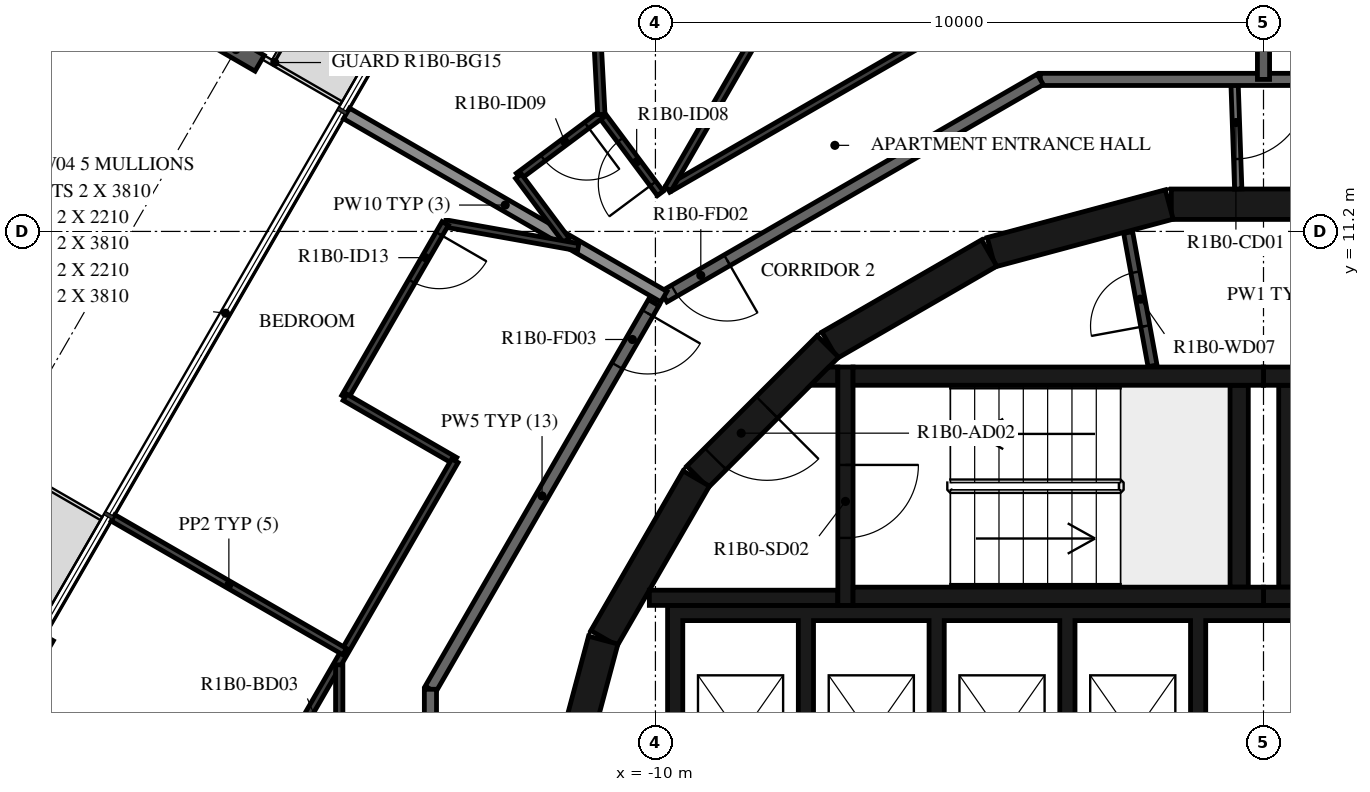
"""IFC4 building model, lengths in metres.
Left out: names, types, materials, properties, quantities, classifications, styles, units other than length and angle.
Written with IfcOpenShell. Run it as: python <this file> out.ifc"""

import sys

from ifc_helpers import new_model, si_unit, direction, frame, frame_2d, origin, origin_2d, place, context, subcontext, project, spatial, polyline, rectangle, i_section, outline, extrude, element, fill, save


model = new_model("IFC4")
c1 = context("Model", 3, precision=1e-05, world=origin(), true_north=direction((0.0, 1.0)))
c2 = subcontext(c1, "Body", "Model", "MODEL_VIEW")
j1 = project(units=[si_unit("LENGTHUNIT", "METRE"), si_unit("PLANEANGLEUNIT", "RADIAN")], contexts=[c1])
p1 = place(None, origin())
s1 = spatial("IfcSite", under=j1, at=p1, CompositionType="ELEMENT")
p2 = place(p1, origin())
s2 = spatial("IfcBuilding", under=s1, at=p2, CompositionType="ELEMENT")
p3 = place(p2, frame((0.0, 0.0, 52.4)))
s3 = spatial("IfcBuildingStorey", under=s2, at=p3, CompositionType="ELEMENT", Elevation=52.4)
p4 = place(p3, frame((-16.899, 14.19, -0.38), z_axis=(0.0, 0.0, 1.0), x_axis=(0.50000017485, 0.866025302835, 0.0)))
e1 = element("IfcColumn", 1, at=p4, inside=s3, PredefinedType="COLUMN", context=c2, shape_type="SweptSolid", body=[
    extrude(i_section(OverallWidth=0.3, OverallDepth=0.9, WebThickness=0.019, FlangeThickness=0.035, FilletRadius=0.03, at=origin_2d()), origin(), (0.0, 0.0, 1.0), 3.5),
])
p5 = place(p3, frame((-19.971, 4.51, 0.0), z_axis=(0.0, 0.0, 1.0), x_axis=(-0.500028443584, -0.866008981251, 0.0)))
e2 = element("IfcWall", 2, at=p5, inside=s3, PredefinedType="STANDARD", context=c2, shape_type="SweptSolid", body=[
    extrude(rectangle(XDim=3.2, YDim=0.16, at=frame_2d((1.6, 0.0))), origin(), (0.0, 0.0, 1.0), 3.12),
])
p6 = place(p5, frame((0.4, 0.0, 0.0)))
e3 = element("IfcOpeningElement", 3, at=p6, cuts=e2, PredefinedType="OPENING", context=c2, shape_type="SweptSolid", body=[
    extrude(rectangle(XDim=2.4, YDim=2.4, at=frame_2d((1.2, 1.2))), frame((0.0, 0.09, 0.0), z_axis=(0.0, -1.0, 0.0), x_axis=(1.0, 0.0, 0.0)), (0.0, 0.0, 1.0), 0.18),
])
for number, where, z_axis, x_axis in (
    (4, (1.516, 11.647, 0.0), (0.0, 0.0, 1.0), (-1.0, 0.0, 0.0)),
    (5, (-1.55, 11.643, 0.0), (0.0, 0.0, 1.0), (-0.966, -0.259, 0.0)),
    (6, (-4.51, 10.845, 0.0), (0.0, 0.0, 1.0), (-0.866, -0.5, 0.0)),
):
    element("IfcWall", number, at=place(p3, frame(where, z_axis=z_axis, x_axis=x_axis)), inside=s3, PredefinedType="SHEAR", context=c2, shape_type="SweptSolid", body=[
        extrude(rectangle(XDim=3.033, YDim=0.5, at=frame_2d((1.516, 0.0))), origin(), (0.0, 0.0, 1.0), 3.12),
    ])
p7 = place(p3, frame((-7.164, 9.308, 0.0), z_axis=(0.0, 0.0, 1.0), x_axis=(-0.707106781187, -0.707106781187, 0.0)))
e7 = element("IfcWall", 7, at=p7, inside=s3, PredefinedType="SHEAR", context=c2, shape_type="SweptSolid", body=[
    extrude(rectangle(XDim=3.032, YDim=0.5, at=frame_2d((1.516, 0.0))), origin(), (0.0, 0.0, 1.0), 3.12),
])
p8 = place(p7, frame((1.416, 0.0, 0.0)))
e8 = element("IfcOpeningElement", 8, at=p8, cuts=e7, PredefinedType="OPENING", context=c2, shape_type="SweptSolid", body=[
    extrude(rectangle(XDim=1.2, YDim=2.1, at=frame_2d((0.6, 1.05))), frame((0.0, 0.26, 0.0), z_axis=(0.0, -1.0, 0.0), x_axis=(1.0, 0.0, 0.0)), (0.0, 0.0, 1.0), 0.52),
])
for number, where, z_axis, x_axis in (
    (9, (-9.329, 7.137, 0.0), (0.0, 0.0, 1.0), (-0.5, -0.866, 0.0)),
    (10, (-10.858, 4.479, 0.0), (0.0, 0.0, 1.0), (-0.259, -0.966, 0.0)),
):
    element("IfcWall", number, at=place(p3, frame(where, z_axis=z_axis, x_axis=x_axis)), inside=s3, PredefinedType="SHEAR", context=c2, shape_type="SweptSolid", body=[
        extrude(rectangle(XDim=3.033, YDim=0.5, at=frame_2d((1.516, 0.0))), origin(), (0.0, 0.0, 1.0), 3.12),
    ])
for number, where, z_axis, x_axis in (
    (11, (0.0, 5.2, 0.0), (0.0, 0.0, 1.0), (1.0, 0.0, 0.0)),
    (12, (0.0, 8.82, 0.0), (0.0, 0.0, 1.0), (1.0, 0.0, 0.0)),
):
    element("IfcWall", number, at=place(p3, frame(where, z_axis=z_axis, x_axis=x_axis)), inside=s3, PredefinedType="SHEAR", context=c2, shape_type="SweptSolid", body=[
        extrude(rectangle(XDim=6.75, YDim=0.3, at=frame_2d((3.375, 0.0))), origin(), (0.0, 0.0, 1.0), 3.12),
    ])
p9 = place(p3, frame((0.4, 5.35, 0.0), z_axis=(0.0, 0.0, 1.0), x_axis=(0.0, 1.0, 0.0)))
e13 = element("IfcWall", 13, at=p9, inside=s3, PredefinedType="SHEAR", context=c2, shape_type="SweptSolid", body=[
    extrude(rectangle(XDim=3.32, YDim=0.3, at=frame_2d((1.66, 0.0))), origin(), (0.0, 0.0, 1.0), 3.12),
])
for number, where, z_axis, x_axis in (
    (14, (-6.75, 5.2, 0.0), (0.0, 0.0, 1.0), (1.0, 0.0, 0.0)),
    (15, (-6.75, 8.82, 0.0), (0.0, 0.0, 1.0), (1.0, 0.0, 0.0)),
):
    element("IfcWall", number, at=place(p3, frame(where, z_axis=z_axis, x_axis=x_axis)), inside=s3, PredefinedType="SHEAR", context=c2, shape_type="SweptSolid", body=[
        extrude(rectangle(XDim=6.75, YDim=0.3, at=frame_2d((3.375, 0.0))), origin(), (0.0, 0.0, 1.0), 3.12),
    ])
p10 = place(p3, frame((-0.4, 5.35, 0.0), z_axis=(0.0, 0.0, 1.0), x_axis=(0.0, 1.0, 0.0)))
e16 = element("IfcWall", 16, at=p10, inside=s3, PredefinedType="SHEAR", context=c2, shape_type="SweptSolid", body=[
    extrude(rectangle(XDim=3.32, YDim=0.3, at=frame_2d((1.66, 0.0))), origin(), (0.0, 0.0, 1.0), 3.12),
])
p11 = place(p3, frame((-6.875, 8.97, 0.0), z_axis=(0.0, 0.0, 1.0), x_axis=(0.0, -1.0, 0.0)))
e17 = element("IfcWall", 17, at=p11, inside=s3, PredefinedType="SHEAR", context=c2, shape_type="SweptSolid", body=[
    extrude(rectangle(XDim=3.92, YDim=0.25, at=frame_2d((1.96, 0.0))), origin(), (0.0, 0.0, 1.0), 3.12),
])
p12 = place(p11, frame((1.61, 0.0, 0.0)))
e18 = element("IfcOpeningElement", 18, at=p12, cuts=e17, PredefinedType="OPENING", context=c2, shape_type="SweptSolid", body=[
    extrude(rectangle(XDim=1.2, YDim=2.1, at=frame_2d((0.6, 1.05))), frame((0.0, 0.135, 0.0), z_axis=(0.0, -1.0, 0.0), x_axis=(1.0, 0.0, 0.0)), (0.0, 0.0, 1.0), 0.27),
])
p13 = place(p3, frame((-7.0, 5.175, 0.0), z_axis=(0.0, 0.0, 1.0), x_axis=(-1.0, 0.0, 0.0)))
e19 = element("IfcWall", 19, at=p13, inside=s3, PredefinedType="SHEAR", context=c2, shape_type="SweptSolid", body=[
    extrude(rectangle(XDim=3.1, YDim=0.25, at=frame_2d((1.55, 0.0))), origin(), (0.0, 0.0, 1.0), 3.12),
])
p14 = place(p3, origin())
e20 = element("IfcWall", 20, at=p14, inside=s3, PredefinedType="SHEAR", context=c2, shape_type="SweptSolid", body=[
    extrude(outline(polyline([(-7.148, 8.97), (-7.0, 8.97), (-7.0, 8.67), (-7.448, 8.67), (-7.148, 8.97)])), origin(), (0.0, 0.0, 1.0), 3.12),
])
p15 = place(p3, origin())
e21 = element("IfcWall", 21, at=p15, inside=s3, PredefinedType="SHEAR", context=c2, shape_type="SweptSolid", body=[
    extrude(outline(polyline([(-9.55, 4.8), (-7.65, 4.8), (-7.65, 1.9), (-7.4, 1.9), (-7.4, 4.8), (-5.5, 4.8), (-5.5, 1.9), (-5.25, 1.9), (-5.25, 4.8), (-3.35, 4.8), (-3.35, 1.9), (-3.1, 1.9), (-3.1, 4.8), (-1.2, 4.8), (-1.2, 1.9), (-0.95, 1.9), (-0.95, 4.8), (0.95, 4.8), (0.95, 1.9), (1.2, 1.9), (1.2, 4.8), (3.1, 4.8), (3.1, 1.9), (3.35, 1.9), (3.35, 4.8), (5.25, 4.8), (5.25, 1.9), (5.5, 1.9), (5.5, 4.8), (7.4, 4.8), (7.4, 1.9), (7.65, 1.9), (7.65, 4.8), (9.55, 4.8), (9.55, 1.9), (9.8, 1.9), (9.8, 4.8), (9.8, 5.05), (-9.8, 5.05), (-9.8, 4.8), (-9.8, 1.9), (-9.55, 1.9), (-9.55, 4.8)])), origin(), (0.0, 0.0, 1.0), 3.12),
])
p16 = place(p3, frame((-1.825, 8.99, 0.0), z_axis=(0.0, 0.0, 1.0), x_axis=(-0.179955206115, 0.983674805915, 0.0)))
e22 = element("IfcWall", 22, at=p16, inside=s3, PredefinedType="PARTITIONING", context=c2, shape_type="SweptSolid", body=[
    extrude(rectangle(XDim=2.229, YDim=0.15, at=frame_2d((1.115, 0.0))), origin(), (0.0, 0.0, 1.0), 3.12),
])
p17 = place(p16, frame((0.665, 0.0, 0.0)))
e23 = element("IfcOpeningElement", 23, at=p17, cuts=e22, PredefinedType="OPENING", context=c2, shape_type="SweptSolid", body=[
    extrude(rectangle(XDim=0.9, YDim=2.1, at=frame_2d((0.45, 1.05))), frame((0.0, 0.085, 0.0), z_axis=(0.0, -1.0, 0.0), x_axis=(1.0, 0.0, 0.0)), (0.0, 0.0, 1.0), 0.17),
])
p18 = place(p3, frame((-0.479, 13.7, 0.0), z_axis=(0.0, 0.0, 1.0), x_axis=(0.034919103017, -0.999390142159, 0.0)))
e24 = element("IfcWall", 24, at=p18, inside=s3, PredefinedType="PARTITIONING", context=c2, shape_type="SweptSolid", body=[
    extrude(rectangle(XDim=1.804, YDim=0.12, at=frame_2d((0.902, 0.0))), origin(), (0.0, 0.0, 1.0), 3.12),
])
p19 = place(p18, frame((0.11, 0.0, 0.0)))
e25 = element("IfcOpeningElement", 25, at=p19, cuts=e24, PredefinedType="OPENING", context=c2, shape_type="SweptSolid", body=[
    extrude(rectangle(XDim=1.2, YDim=2.1, at=frame_2d((0.6, 1.05))), frame((0.0, 0.07, 0.0), z_axis=(0.0, -1.0, 0.0), x_axis=(1.0, 0.0, 0.0)), (0.0, 0.0, 1.0), 0.14),
])
p20 = place(p3, frame((3.671, 13.7, 0.0), z_axis=(0.0, 0.0, 1.0), x_axis=(-1.0, 0.0, 0.0)))
e26 = element("IfcWall", 26, at=p20, inside=s3, PredefinedType="STANDARD", context=c2, shape_type="SweptSolid", body=[
    extrude(rectangle(XDim=7.342, YDim=0.2, at=frame_2d((3.671, 0.0))), origin(), (0.0, 0.0, 1.0), 3.12),
])
p21 = place(p3, frame((-3.671, 13.7, 0.0), z_axis=(0.0, 0.0, 1.0), x_axis=(-0.866031419417, -0.499989580474, 0.0)))
e27 = element("IfcWall", 27, at=p21, inside=s3, PredefinedType="STANDARD", context=c2, shape_type="SweptSolid", body=[
    extrude(rectangle(XDim=7.147, YDim=0.2, at=frame_2d((3.573, 0.0))), origin(), (0.0, 0.0, 1.0), 3.12),
])
p22 = place(p21, frame((5.947, 0.0, 0.0)))
e28 = element("IfcOpeningElement", 28, at=p22, cuts=e27, PredefinedType="OPENING", context=c2, shape_type="SweptSolid", body=[
    extrude(rectangle(XDim=1.0, YDim=2.1, at=frame_2d((0.5, 1.05))), frame((0.0, 0.11, 0.0), z_axis=(0.0, -1.0, 0.0), x_axis=(1.0, 0.0, 0.0)), (0.0, 0.0, 1.0), 0.22),
])
p23 = place(p3, frame((-10.029, 10.029, 0.0), z_axis=(0.0, 0.0, 1.0), x_axis=(-0.500001669485, -0.866024439905, 0.0)))
e29 = element("IfcWall", 29, at=p23, inside=s3, PredefinedType="STANDARD", context=c2, shape_type="SweptSolid", body=[
    extrude(rectangle(XDim=7.342, YDim=0.2, at=frame_2d((3.671, 0.0))), origin(), (0.0, 0.0, 1.0), 3.12),
])
p24 = place(p23, frame((0.2, 0.0, 0.0)))
e30 = element("IfcOpeningElement", 30, at=p24, cuts=e29, PredefinedType="OPENING", context=c2, shape_type="SweptSolid", body=[
    extrude(rectangle(XDim=1.0, YDim=2.1, at=frame_2d((0.5, 1.05))), frame((0.0, 0.11, 0.0), z_axis=(0.0, -1.0, 0.0), x_axis=(1.0, 0.0, 0.0)), (0.0, 0.0, 1.0), 0.22),
])
p25 = place(p3, frame((-13.7, 3.671, 0.0), z_axis=(0.0, 0.0, 1.0), x_axis=(0.0, -1.0, 0.0)))
e31 = element("IfcWall", 31, at=p25, inside=s3, PredefinedType="STANDARD", context=c2, shape_type="SweptSolid", body=[
    extrude(rectangle(XDim=7.342, YDim=0.2, at=frame_2d((3.671, 0.0))), origin(), (0.0, 0.0, 1.0), 3.12),
])
p26 = place(p3, frame((0.0, 19.326, 0.0), z_axis=(0.0, 0.0, 1.0), x_axis=(0.0, -1.0, 0.0)))
e32 = element("IfcWall", 32, at=p26, inside=s3, PredefinedType="STANDARD", context=c2, shape_type="SweptSolid", body=[
    extrude(rectangle(XDim=5.626, YDim=0.2, at=frame_2d((2.813, 0.0))), origin(), (0.0, 0.0, 1.0), 3.12),
])
p27 = place(p3, frame((-15.08, 13.14, 0.0), z_axis=(0.0, 0.0, 1.0), x_axis=(0.86603112331, -0.49999009336, 0.0)))
e33 = element("IfcWall", 33, at=p27, inside=s3, PredefinedType="STANDARD", context=c2, shape_type="SweptSolid", body=[
    extrude(rectangle(XDim=6.027, YDim=0.2, at=frame_2d((3.014, 0.0))), origin(), (0.0, 0.0, 1.0), 2.73),
])
p28 = place(p3, frame((-9.92, 11.824, 0.0), z_axis=(0.0, 0.0, 1.0), x_axis=(-0.597853402964, 0.801605456921, 0.0)))
e34 = element("IfcWall", 34, at=p28, inside=s3, PredefinedType="PARTITIONING", context=c2, shape_type="SweptSolid", body=[
    extrude(rectangle(XDim=1.621, YDim=0.12, at=frame_2d((0.811, 0.0))), origin(), (0.0, 0.0, 1.0), 3.12),
])
p29 = place(p28, frame((0.2, 0.0, 0.0)))
e35 = element("IfcOpeningElement", 35, at=p29, cuts=e34, PredefinedType="OPENING", context=c2, shape_type="SweptSolid", body=[
    extrude(rectangle(XDim=0.9, YDim=2.1, at=frame_2d((0.45, 1.05))), frame((0.0, 0.07, 0.0), z_axis=(0.0, -1.0, 0.0), x_axis=(1.0, 0.0, 0.0)), (0.0, 0.0, 1.0), 0.14),
])
p30 = place(p3, frame((-4.088, 15.191, 0.0), z_axis=(0.0, 0.0, 1.0), x_axis=(-0.866024500911, -0.50000156382, 0.0)))
e36 = element("IfcWall", 36, at=p30, inside=s3, PredefinedType="PARTITIONING", context=c2, shape_type="SweptSolid", body=[
    extrude(rectangle(XDim=6.587, YDim=0.12, at=frame_2d((3.294, 0.0))), origin(), (0.0, 0.0, 1.0), 3.12),
])
p31 = place(p30, frame((0.4, 0.0, 0.0)))
e37 = element("IfcOpeningElement", 37, at=p31, cuts=e36, PredefinedType="OPENING", context=c2, shape_type="SweptSolid", body=[
    extrude(rectangle(XDim=0.8, YDim=2.1, at=frame_2d((0.4, 1.05))), frame((0.0, 0.07, 0.0), z_axis=(0.0, -1.0, 0.0), x_axis=(1.0, 0.0, 0.0)), (0.0, 0.0, 1.0), 0.14),
])
p32 = place(p3, frame((-10.889, 13.124, 0.0), z_axis=(0.0, 0.0, 1.0), x_axis=(-0.801616976804, -0.597837956724, 0.0)))
e38 = element("IfcWall", 38, at=p32, inside=s3, PredefinedType="PARTITIONING", context=c2, shape_type="SweptSolid", body=[
    extrude(rectangle(XDim=1.7, YDim=0.12, at=frame_2d((0.85, 0.0))), origin(), (0.0, 0.0, 1.0), 3.12),
])
p33 = place(p32, frame((0.3, 0.0, 0.0)))
e39 = element("IfcOpeningElement", 39, at=p33, cuts=e38, PredefinedType="OPENING", context=c2, shape_type="SweptSolid", body=[
    extrude(rectangle(XDim=0.9, YDim=2.1, at=frame_2d((0.45, 1.05))), frame((0.0, 0.07, 0.0), z_axis=(0.0, -1.0, 0.0), x_axis=(1.0, 0.0, 0.0)), (0.0, 0.0, 1.0), 0.14),
])
p34 = place(p3, frame((-12.252, 12.107, 0.0), z_axis=(0.0, 0.0, 1.0), x_axis=(0.597827926538, -0.801624457119, 0.0)))
e40 = element("IfcWall", 40, at=p34, inside=s3, PredefinedType="PARTITIONING", context=c2, shape_type="SweptSolid", body=[
    extrude(rectangle(XDim=1.314, YDim=0.12, at=frame_2d((0.657, 0.0))), origin(), (0.0, 0.0, 1.0), 3.12),
])
p35 = place(p3, frame((-9.793, 11.897, 0.0), z_axis=(0.0, 0.0, 1.0), x_axis=(0.499981117606, 0.866036305265, 0.0)))
e41 = element("IfcWall", 41, at=p35, inside=s3, PredefinedType="PARTITIONING", context=c2, shape_type="SweptSolid", body=[
    extrude(rectangle(XDim=14.434, YDim=0.12, at=frame_2d((7.217, 0.0))), origin(), (0.0, 0.0, 1.0), 3.12),
])
p36 = place(p35, frame((11.97, 0.0, 0.0)))
e42 = element("IfcOpeningElement", 42, at=p36, cuts=e41, PredefinedType="OPENING", context=c2, shape_type="SweptSolid", body=[
    extrude(rectangle(XDim=0.9, YDim=2.1, at=frame_2d((0.45, 1.05))), frame((0.0, 0.07, 0.0), z_axis=(0.0, -1.0, 0.0), x_axis=(1.0, 0.0, 0.0)), (0.0, 0.0, 1.0), 0.14),
])
p37 = place(p3, frame((-11.24, 19.792, 0.0), z_axis=(0.0, 0.0, 1.0), x_axis=(0.052579943632, -0.998616718029, 0.0)))
e43 = element("IfcWall", 43, at=p37, inside=s3, PredefinedType="PARTITIONING", context=c2, shape_type="SweptSolid", body=[
    extrude(rectangle(XDim=6.677, YDim=0.12, at=frame_2d((3.338, 0.0))), origin(), (0.0, 0.0, 1.0), 3.12),
])
p38 = place(p3, frame((-11.27, 10.94, 0.0), z_axis=(0.0, 0.0, 1.0), x_axis=(-0.984382718707, 0.176041651637, 0.0)))
e44 = element("IfcWall", 44, at=p38, inside=s3, PredefinedType="PARTITIONING", context=c2, shape_type="SweptSolid", body=[
    extrude(rectangle(XDim=2.222, YDim=0.12, at=frame_2d((1.111, 0.0))), origin(), (0.0, 0.0, 1.0), 3.12),
])
p39 = place(p3, frame((-13.457, 11.332, 0.0), z_axis=(0.0, 0.0, 1.0), x_axis=(-0.499974350878, -0.866040211805, 0.0)))
e45 = element("IfcWall", 45, at=p39, inside=s3, PredefinedType="PARTITIONING", context=c2, shape_type="SweptSolid", body=[
    extrude(rectangle(XDim=3.3, YDim=0.12, at=frame_2d((1.65, 0.0))), origin(), (0.0, 0.0, 1.0), 3.12),
])
p40 = place(p39, frame((0.2, 0.0, 0.0)))
e46 = element("IfcOpeningElement", 46, at=p40, cuts=e45, PredefinedType="OPENING", context=c2, shape_type="SweptSolid", body=[
    extrude(rectangle(XDim=0.9, YDim=2.1, at=frame_2d((0.45, 1.05))), frame((0.0, 0.07, 0.0), z_axis=(0.0, -1.0, 0.0), x_axis=(1.0, 0.0, 0.0)), (0.0, 0.0, 1.0), 0.14),
])
p41 = place(p3, frame((-15.106, 8.474, 0.0), z_axis=(0.0, 0.0, 1.0), x_axis=(0.866041603473, -0.499971940267, 0.0)))
e47 = element("IfcWall", 47, at=p41, inside=s3, PredefinedType="PARTITIONING", context=c2, shape_type="SweptSolid", body=[
    extrude(rectangle(XDim=2.089, YDim=0.12, at=frame_2d((1.045, 0.0))), origin(), (0.0, 0.0, 1.0), 3.12),
])
p42 = place(p3, frame((-13.297, 7.429, 0.0), z_axis=(0.0, 0.0, 1.0), x_axis=(-0.49999903102, -0.866025963225, 0.0)))
e48 = element("IfcWall", 48, at=p42, inside=s3, PredefinedType="PARTITIONING", context=c2, shape_type="SweptSolid", body=[
    extrude(rectangle(XDim=7.667, YDim=0.12, at=frame_2d((3.833, 0.0))), origin(), (0.0, 0.0, 1.0), 3.12),
])
p43 = place(p3, frame((-15.2, 4.073, 0.0), z_axis=(0.0, 0.0, 1.0), x_axis=(0.0, -1.0, 0.0)))
e49 = element("IfcWall", 49, at=p43, inside=s3, PredefinedType="PARTITIONING", context=c2, shape_type="SweptSolid", body=[
    extrude(rectangle(XDim=4.398, YDim=0.12, at=frame_2d((2.199, 0.0))), origin(), (0.0, 0.0, 1.0), 3.12),
])
p44 = place(p43, frame((1.4, 0.0, 0.0)))
e50 = element("IfcOpeningElement", 50, at=p44, cuts=e49, PredefinedType="OPENING", context=c2, shape_type="SweptSolid", body=[
    extrude(rectangle(XDim=0.8, YDim=2.1, at=frame_2d((0.4, 1.05))), frame((0.0, 0.07, 0.0), z_axis=(0.0, -1.0, 0.0), x_axis=(1.0, 0.0, 0.0)), (0.0, 0.0, 1.0), 0.14),
])
p45 = place(p3, frame((-18.92, 6.49, 0.0), z_axis=(0.0, 0.0, 1.0), x_axis=(0.865994303029, -0.500053864221, 0.0)))
e51 = element("IfcWall", 51, at=p45, inside=s3, PredefinedType="PARTITIONING", context=c2, shape_type="SweptSolid", body=[
    extrude(rectangle(XDim=4.4, YDim=0.12, at=frame_2d((2.2, 0.0))), origin(), (0.0, 0.0, 1.0), 2.73),
])
p46 = place(p12, origin())
e52 = element("IfcDoor", 52, at=p46, inside=s3, OperationType="SINGLE_SWING_LEFT", PredefinedType="DOOR", context=c2, shape_type="SweptSolid", body=[
    extrude(rectangle(XDim=1.2, YDim=2.1, at=frame_2d((0.6, 1.05))), frame((0.0, 0.025, 0.0), z_axis=(0.0, -1.0, 0.0), x_axis=(1.0, 0.0, 0.0)), (0.0, 0.0, 1.0), 0.05),
])
fill(e18, e52)
p47 = place(p8, origin())
e53 = element("IfcDoor", 53, at=p47, inside=s3, OperationType="SINGLE_SWING_RIGHT", PredefinedType="DOOR", context=c2, shape_type="SweptSolid", body=[
    extrude(rectangle(XDim=1.2, YDim=2.1, at=frame_2d((0.6, 1.05))), frame((0.0, 0.025, 0.0), z_axis=(0.0, -1.0, 0.0), x_axis=(1.0, 0.0, 0.0)), (0.0, 0.0, 1.0), 0.05),
])
fill(e8, e53)
p48 = place(p17, origin())
e54 = element("IfcDoor", 54, at=p48, inside=s3, OperationType="SINGLE_SWING_RIGHT", PredefinedType="DOOR", context=c2, shape_type="SweptSolid", body=[
    extrude(rectangle(XDim=0.9, YDim=2.1, at=frame_2d((0.45, 1.05))), frame((0.0, 0.025, 0.0), z_axis=(0.0, -1.0, 0.0), x_axis=(1.0, 0.0, 0.0)), (0.0, 0.0, 1.0), 0.05),
])
fill(e23, e54)
p49 = place(p22, origin())
e55 = element("IfcDoor", 55, at=p49, inside=s3, OperationType="SINGLE_SWING_LEFT", PredefinedType="DOOR", context=c2, shape_type="SweptSolid", body=[
    extrude(rectangle(XDim=1.0, YDim=2.1, at=frame_2d((0.5, 1.05))), frame((0.0, 0.025, 0.0), z_axis=(0.0, -1.0, 0.0), x_axis=(1.0, 0.0, 0.0)), (0.0, 0.0, 1.0), 0.05),
])
fill(e28, e55)
p50 = place(p29, origin())
e56 = element("IfcDoor", 56, at=p50, inside=s3, OperationType="SINGLE_SWING_RIGHT", PredefinedType="DOOR", context=c2, shape_type="SweptSolid", body=[
    extrude(rectangle(XDim=0.9, YDim=2.1, at=frame_2d((0.45, 1.05))), frame((0.0, 0.025, 0.0), z_axis=(0.0, -1.0, 0.0), x_axis=(1.0, 0.0, 0.0)), (0.0, 0.0, 1.0), 0.05),
])
fill(e35, e56)
p51 = place(p33, origin())
e57 = element("IfcDoor", 57, at=p51, inside=s3, OperationType="SINGLE_SWING_LEFT", PredefinedType="DOOR", context=c2, shape_type="SweptSolid", body=[
    extrude(rectangle(XDim=0.9, YDim=2.1, at=frame_2d((0.45, 1.05))), frame((0.0, 0.025, 0.0), z_axis=(0.0, -1.0, 0.0), x_axis=(1.0, 0.0, 0.0)), (0.0, 0.0, 1.0), 0.05),
])
fill(e39, e57)
p52 = place(p24, origin())
e58 = element("IfcDoor", 58, at=p52, inside=s3, OperationType="SINGLE_SWING_LEFT", PredefinedType="DOOR", context=c2, shape_type="SweptSolid", body=[
    extrude(rectangle(XDim=1.0, YDim=2.1, at=frame_2d((0.5, 1.05))), frame((0.0, 0.025, 0.0), z_axis=(0.0, -1.0, 0.0), x_axis=(1.0, 0.0, 0.0)), (0.0, 0.0, 1.0), 0.05),
])
fill(e30, e58)
p53 = place(p40, origin())
e59 = element("IfcDoor", 59, at=p53, inside=s3, OperationType="SINGLE_SWING_LEFT", PredefinedType="DOOR", context=c2, shape_type="SweptSolid", body=[
    extrude(rectangle(XDim=0.9, YDim=2.1, at=frame_2d((0.45, 1.05))), frame((0.0, 0.025, 0.0), z_axis=(0.0, -1.0, 0.0), x_axis=(1.0, 0.0, 0.0)), (0.0, 0.0, 1.0), 0.05),
])
fill(e46, e59)
p54 = place(p19, origin())
e60 = element("IfcDoor", 60, at=p54, inside=s3, OperationType="DOUBLE_DOOR_SINGLE_SWING", PredefinedType="DOOR", context=c2, shape_type="SweptSolid", body=[
    extrude(rectangle(XDim=1.2, YDim=2.1, at=frame_2d((0.6, 1.05))), frame((0.0, 0.025, 0.0), z_axis=(0.0, -1.0, 0.0), x_axis=(1.0, 0.0, 0.0)), (0.0, 0.0, 1.0), 0.05),
])
fill(e25, e60)
save(model, sys.argv[1])
